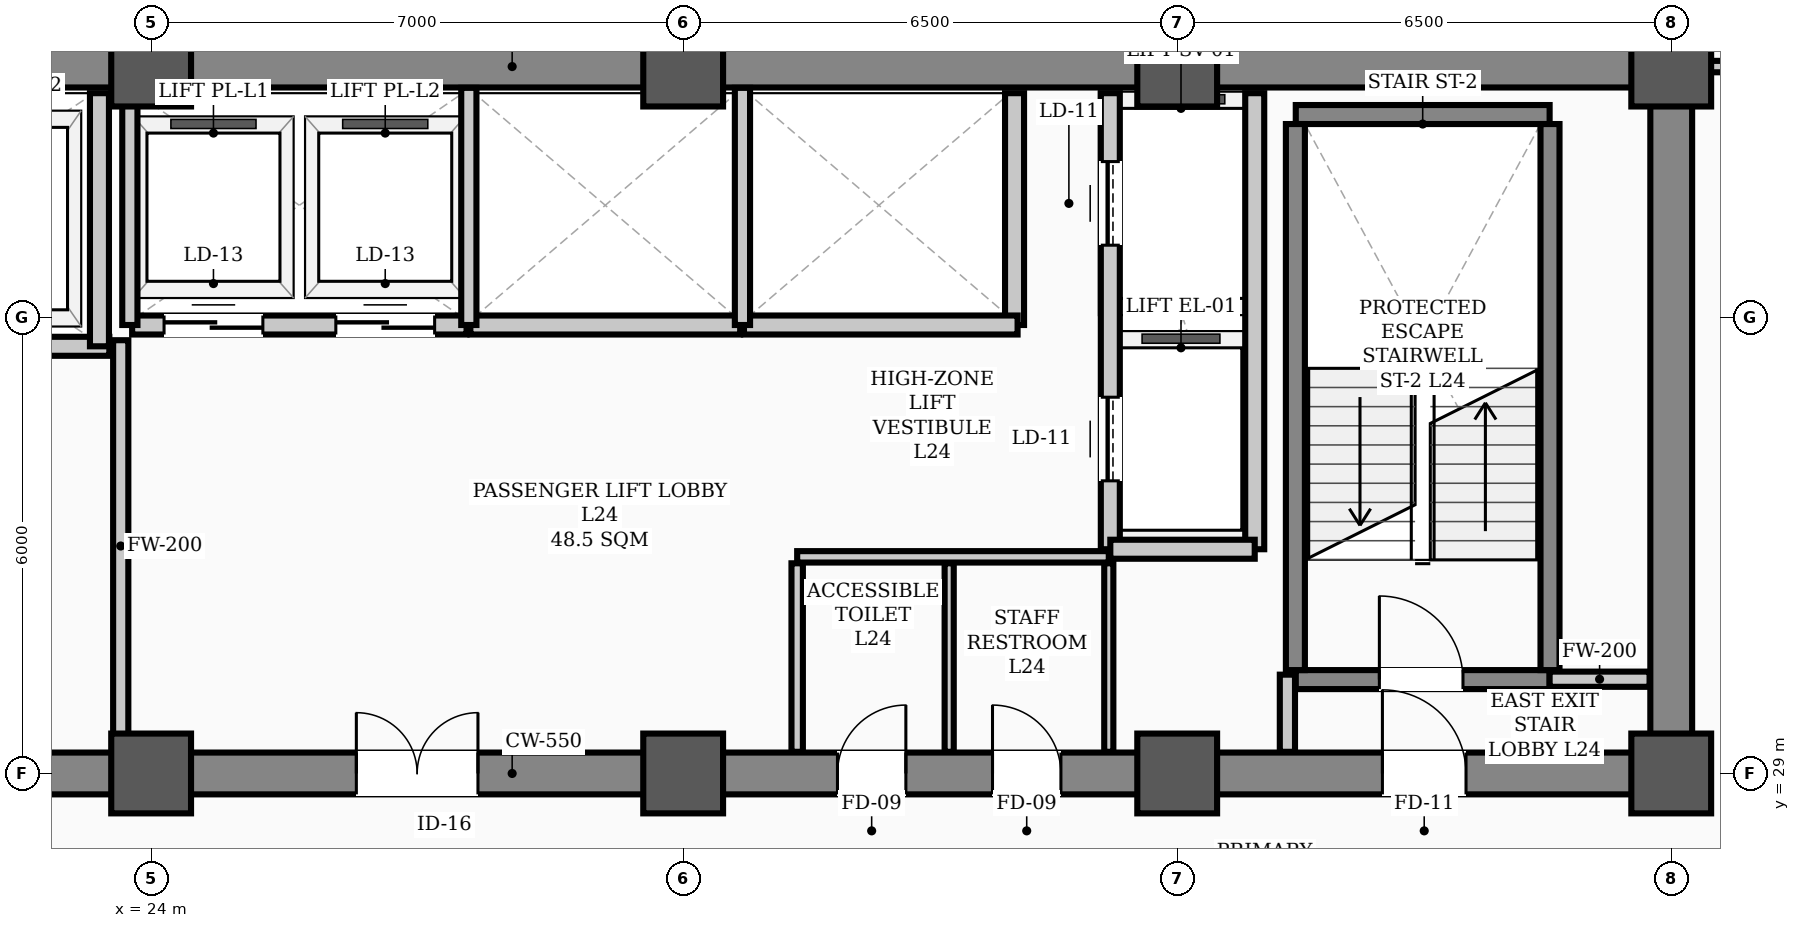
"""IFC4 building model, lengths in metres.
Left out: names, types, materials, properties, quantities, classifications, styles, units other than length and angle.
Written with IfcOpenShell. Run it as: python <this file> out.ifc"""

import sys

from ifc_helpers import new_model, si_unit, direction, frame, frame_2d, origin, origin_2d, place, context, subcontext, project, spatial, rectangle, hollow_rectangle, extrude, element, fill, save


model = new_model("IFC4")
c1 = context("Model", 3, precision=1e-05, world=origin(), true_north=direction((0.0, 1.0)))
c2 = subcontext(c1, "Body", "Model", "MODEL_VIEW")
j1 = project(units=[si_unit("LENGTHUNIT", "METRE"), si_unit("PLANEANGLEUNIT", "RADIAN")], contexts=[c1])
p1 = place(None, origin())
s1 = spatial("IfcSite", under=j1, at=p1, CompositionType="ELEMENT")
p2 = place(p1, origin())
s2 = spatial("IfcBuilding", under=s1, at=p2, CompositionType="ELEMENT")
p3 = place(p2, frame((0.0, 0.0, 96.7)))
s3 = spatial("IfcBuildingStorey", under=s2, at=p3, CompositionType="ELEMENT", Elevation=96.7)
for number, where, z_axis, x_axis in (
    (1, (24.0, 29.0, 0.0), (0.0, 0.0, 1.0), (1.0, 0.0, 0.0)),
    (2, (24.0, 38.3, 0.0), (0.0, 0.0, 1.0), (1.0, 0.0, 0.0)),
    (3, (31.0, 29.0, 0.0), (0.0, 0.0, 1.0), (1.0, 0.0, 0.0)),
    (4, (31.0, 38.3, 0.0), (0.0, 0.0, 1.0), (1.0, 0.0, 0.0)),
    (5, (37.5, 29.0, 0.0), (0.0, 0.0, 1.0), (1.0, 0.0, 0.0)),
    (6, (37.5, 38.3, 0.0), (0.0, 0.0, 1.0), (1.0, 0.0, 0.0)),
    (7, (44.0, 29.0, 0.0), (0.0, 0.0, 1.0), (1.0, 0.0, 0.0)),
    (8, (44.0, 38.3, 0.0), (0.0, 0.0, 1.0), (1.0, 0.0, 0.0)),
):
    element("IfcColumn", number, at=place(p3, frame(where, z_axis=z_axis, x_axis=x_axis)), inside=s3, PredefinedType="COLUMN", context=c2, shape_type="SweptSolid", body=[
        extrude(hollow_rectangle(XDim=1.05, YDim=1.05, WallThickness=0.038, InnerFilletRadius=0.019, OuterFilletRadius=0.057, at=origin_2d()), origin(), (0.0, 0.0, 1.0), 3.9),
    ])
p4 = place(p3, frame((13.5, 29.0, 0.0), z_axis=(0.0, 0.0, 1.0), x_axis=(1.0, 0.0, 0.0)))
e9 = element("IfcWall", 9, at=p4, inside=s3, PredefinedType="SHEAR", context=c2, shape_type="SweptSolid", body=[
    extrude(rectangle(XDim=30.5, YDim=0.55, at=frame_2d((15.25, 0.0))), origin(), (0.0, 0.0, 1.0), 3.6),
])
p5 = place(p4, frame((1.75, 0.0, 0.0)))
e10 = element("IfcOpeningElement", 10, at=p5, cuts=e9, PredefinedType="OPENING", context=c2, shape_type="SweptSolid", body=[
    extrude(rectangle(XDim=1.1, YDim=2.08, at=frame_2d((0.55, 1.04))), frame((0.0, 0.285, 0.0), z_axis=(0.0, -1.0, 0.0), x_axis=(1.0, 0.0, 0.0)), (0.0, 0.0, 1.0), 0.57),
])
p6 = place(p4, frame((26.7, 0.0, 0.0)))
e11 = element("IfcOpeningElement", 11, at=p6, cuts=e9, PredefinedType="OPENING", context=c2, shape_type="SweptSolid", body=[
    extrude(rectangle(XDim=1.1, YDim=2.08, at=frame_2d((0.55, 1.04))), frame((0.0, 0.285, 0.0), z_axis=(0.0, -1.0, 0.0), x_axis=(1.0, 0.0, 0.0)), (0.0, 0.0, 1.0), 0.57),
])
p7 = place(p4, frame((6.8, 0.0, 0.0)))
e12 = element("IfcOpeningElement", 12, at=p7, cuts=e9, PredefinedType="OPENING", context=c2, shape_type="SweptSolid", body=[
    extrude(rectangle(XDim=1.1, YDim=2.08, at=frame_2d((0.55, 1.04))), frame((0.0, 0.285, 0.0), z_axis=(0.0, -1.0, 0.0), x_axis=(1.0, 0.0, 0.0)), (0.0, 0.0, 1.0), 0.57),
])
p8 = place(p4, frame((13.2, 0.0, 0.0)))
e13 = element("IfcOpeningElement", 13, at=p8, cuts=e9, PredefinedType="OPENING", context=c2, shape_type="SweptSolid", body=[
    extrude(rectangle(XDim=1.6, YDim=2.08, at=frame_2d((0.8, 1.04))), frame((0.0, 0.285, 0.0), z_axis=(0.0, -1.0, 0.0), x_axis=(1.0, 0.0, 0.0)), (0.0, 0.0, 1.0), 0.57),
])
p9 = place(p4, frame((19.53, 0.0, 0.0)))
e14 = element("IfcOpeningElement", 14, at=p9, cuts=e9, PredefinedType="OPENING", context=c2, shape_type="SweptSolid", body=[
    extrude(rectangle(XDim=0.9, YDim=2.08, at=frame_2d((0.45, 1.04))), frame((0.0, 0.285, 0.0), z_axis=(0.0, -1.0, 0.0), x_axis=(1.0, 0.0, 0.0)), (0.0, 0.0, 1.0), 0.57),
])
p10 = place(p4, frame((21.57, 0.0, 0.0)))
e15 = element("IfcOpeningElement", 15, at=p10, cuts=e9, PredefinedType="OPENING", context=c2, shape_type="SweptSolid", body=[
    extrude(rectangle(XDim=0.9, YDim=2.08, at=frame_2d((0.45, 1.04))), frame((0.0, 0.285, 0.0), z_axis=(0.0, -1.0, 0.0), x_axis=(1.0, 0.0, 0.0)), (0.0, 0.0, 1.0), 0.57),
])
p11 = place(p3, frame((13.5, 38.3, 0.0), z_axis=(0.0, 0.0, 1.0), x_axis=(1.0, 0.0, 0.0)))
e16 = element("IfcWall", 16, at=p11, inside=s3, PredefinedType="SHEAR", context=c2, shape_type="SweptSolid", body=[
    extrude(rectangle(XDim=30.5, YDim=0.55, at=frame_2d((15.25, 0.0))), origin(), (0.0, 0.0, 1.0), 3.6),
])
p12 = place(p3, frame((44.0, 29.35, 0.0), z_axis=(0.0, 0.0, 1.0), x_axis=(0.0, 1.0, 0.0)))
e17 = element("IfcWall", 17, at=p12, inside=s3, PredefinedType="SHEAR", context=c2, shape_type="SweptSolid", body=[
    extrude(rectangle(XDim=8.6, YDim=0.55, at=frame_2d((4.3, 0.0))), origin(), (0.0, 0.0, 1.0), 3.6),
])
p13 = place(p3, frame((39.06, 30.235, 0.0), z_axis=(0.0, 0.0, 1.0), x_axis=(1.0, 0.0, 0.0)))
e18 = element("IfcWall", 18, at=p13, inside=s3, PredefinedType="STANDARD", context=c2, shape_type="SweptSolid", body=[
    extrude(rectangle(XDim=3.34, YDim=0.25, at=frame_2d((1.67, 0.0))), origin(), (0.0, 0.0, 1.0), 3.6),
])
p14 = place(p13, frame((1.1, 0.0, 0.0)))
e19 = element("IfcOpeningElement", 19, at=p14, cuts=e18, PredefinedType="OPENING", context=c2, shape_type="SweptSolid", body=[
    extrude(rectangle(XDim=1.1, YDim=2.08, at=frame_2d((0.55, 1.04))), frame((0.0, 0.135, 0.0), z_axis=(0.0, -1.0, 0.0), x_axis=(1.0, 0.0, 0.0)), (0.0, 0.0, 1.0), 0.27),
])
p15 = place(p3, frame((39.06, 37.669, 0.0), z_axis=(0.0, 0.0, 1.0), x_axis=(1.0, 0.0, 0.0)))
e20 = element("IfcWall", 20, at=p15, inside=s3, PredefinedType="STANDARD", context=c2, shape_type="SweptSolid", body=[
    extrude(rectangle(XDim=3.34, YDim=0.25, at=frame_2d((1.67, 0.0))), origin(), (0.0, 0.0, 1.0), 3.6),
])
for number, where, z_axis, x_axis in (
    (21, (39.055, 30.36, 0.0), (0.0, 0.0, 1.0), (0.0, 1.0, 0.0)),
    (22, (42.405, 30.36, 0.0), (0.0, 0.0, 1.0), (0.0, 1.0, 0.0)),
):
    element("IfcWall", number, at=place(p3, frame(where, z_axis=z_axis, x_axis=x_axis)), inside=s3, PredefinedType="STANDARD", context=c2, shape_type="SweptSolid", body=[
        extrude(rectangle(XDim=7.184, YDim=0.25, at=frame_2d((3.592, 0.0))), origin(), (0.0, 0.0, 1.0), 3.6),
    ])
p16 = place(p3, frame((18.1, 34.62, 0.0), z_axis=(0.0, 0.0, 1.0), x_axis=(1.0, 0.0, 0.0)))
e23 = element("IfcWall", 23, at=p16, inside=s3, PredefinedType="STANDARD", context=c2, shape_type="SweptSolid", body=[
    extrude(rectangle(XDim=5.35, YDim=0.25, at=frame_2d((2.675, 0.0))), origin(), (0.0, 0.0, 1.0), 3.6),
])
p17 = place(p16, frame((0.85, 0.0, 0.0)))
e24 = element("IfcOpeningElement", 24, at=p17, cuts=e23, PredefinedType="OPENING", context=c2, shape_type="SweptSolid", body=[
    extrude(rectangle(XDim=1.1, YDim=2.08, at=frame_2d((0.55, 1.04))), frame((0.0, 0.135, 0.0), z_axis=(0.0, -1.0, 0.0), x_axis=(1.0, 0.0, 0.0)), (0.0, 0.0, 1.0), 0.27),
])
p18 = place(p16, frame((3.45, 0.0, 0.0)))
e25 = element("IfcOpeningElement", 25, at=p18, cuts=e23, PredefinedType="OPENING", context=c2, shape_type="SweptSolid", body=[
    extrude(rectangle(XDim=1.1, YDim=2.08, at=frame_2d((0.55, 1.04))), frame((0.0, 0.135, 0.0), z_axis=(0.0, -1.0, 0.0), x_axis=(1.0, 0.0, 0.0)), (0.0, 0.0, 1.0), 0.27),
])
p19 = place(p3, frame((36.62, 31.95, 0.0), z_axis=(0.0, 0.0, 1.0), x_axis=(0.0, 1.0, 0.0)))
e26 = element("IfcWall", 26, at=p19, inside=s3, PredefinedType="STANDARD", context=c2, shape_type="SweptSolid", body=[
    extrude(rectangle(XDim=6.0, YDim=0.25, at=frame_2d((3.0, 0.0))), origin(), (0.0, 0.0, 1.0), 2.18),
])
p20 = place(p19, frame((0.9, 0.0, 0.0)))
e27 = element("IfcOpeningElement", 27, at=p20, cuts=e26, PredefinedType="OPENING", context=c2, shape_type="SweptSolid", body=[
    extrude(rectangle(XDim=1.1, YDim=2.08, at=frame_2d((0.55, 1.04))), frame((0.0, 0.135, 0.0), z_axis=(0.0, -1.0, 0.0), x_axis=(1.0, 0.0, 0.0)), (0.0, 0.0, 1.0), 0.27),
])
p21 = place(p19, frame((4.0, 0.0, 0.0)))
e28 = element("IfcOpeningElement", 28, at=p21, cuts=e26, PredefinedType="OPENING", context=c2, shape_type="SweptSolid", body=[
    extrude(rectangle(XDim=1.1, YDim=2.08, at=frame_2d((0.55, 1.04))), frame((0.0, 0.135, 0.0), z_axis=(0.0, -1.0, 0.0), x_axis=(1.0, 0.0, 0.0)), (0.0, 0.0, 1.0), 0.27),
])
p22 = place(p3, frame((38.52, 31.95, 0.0), z_axis=(0.0, 0.0, 1.0), x_axis=(0.0, 1.0, 0.0)))
e29 = element("IfcWall", 29, at=p22, inside=s3, PredefinedType="STANDARD", context=c2, shape_type="SweptSolid", body=[
    extrude(rectangle(XDim=6.0, YDim=0.25, at=frame_2d((3.0, 0.0))), origin(), (0.0, 0.0, 1.0), 2.18),
])
p23 = place(p3, frame((36.62, 31.95, 0.0), z_axis=(0.0, 0.0, 1.0), x_axis=(1.0, 0.0, 0.0)))
e30 = element("IfcWall", 30, at=p23, inside=s3, PredefinedType="STANDARD", context=c2, shape_type="SweptSolid", body=[
    extrude(rectangle(XDim=1.9, YDim=0.25, at=frame_2d((0.95, 0.0))), origin(), (0.0, 0.0, 1.0), 3.48),
])
p24 = place(p3, frame((23.32, 34.62, 0.0), z_axis=(0.0, 0.0, 1.0), x_axis=(0.0, 1.0, 0.0)))
e31 = element("IfcWall", 31, at=p24, inside=s3, PredefinedType="STANDARD", context=c2, shape_type="SweptSolid", body=[
    extrude(rectangle(XDim=3.33, YDim=0.25, at=frame_2d((1.665, 0.0))), origin(), (0.0, 0.0, 1.0), 2.18),
])
p25 = place(p3, frame((35.36, 34.9, 0.0), z_axis=(0.0, 0.0, 1.0), x_axis=(0.0, 1.0, 0.0)))
e32 = element("IfcWall", 32, at=p25, inside=s3, PredefinedType="STANDARD", context=c2, shape_type="SweptSolid", body=[
    extrude(rectangle(XDim=3.05, YDim=0.25, at=frame_2d((1.525, 0.0))), origin(), (0.0, 0.0, 1.0), 2.18),
])
p26 = place(p3, frame((23.75, 34.9, 0.0), z_axis=(0.0, 0.0, 1.0), x_axis=(1.0, 0.0, 0.0)))
e33 = element("IfcWall", 33, at=p26, inside=s3, PredefinedType="STANDARD", context=c2, shape_type="SweptSolid", body=[
    extrude(rectangle(XDim=4.4, YDim=0.25, at=frame_2d((2.2, 0.0))), origin(), (0.0, 0.0, 1.0), 3.6),
])
p27 = place(p26, frame((0.42, 0.0, 0.0)))
e34 = element("IfcOpeningElement", 34, at=p27, cuts=e33, PredefinedType="OPENING", context=c2, shape_type="SweptSolid", body=[
    extrude(rectangle(XDim=1.3, YDim=2.08, at=frame_2d((0.65, 1.04))), frame((0.0, 0.135, 0.0), z_axis=(0.0, -1.0, 0.0), x_axis=(1.0, 0.0, 0.0)), (0.0, 0.0, 1.0), 0.27),
])
p28 = place(p26, frame((2.68, 0.0, 0.0)))
e35 = element("IfcOpeningElement", 35, at=p28, cuts=e33, PredefinedType="OPENING", context=c2, shape_type="SweptSolid", body=[
    extrude(rectangle(XDim=1.3, YDim=2.08, at=frame_2d((0.65, 1.04))), frame((0.0, 0.135, 0.0), z_axis=(0.0, -1.0, 0.0), x_axis=(1.0, 0.0, 0.0)), (0.0, 0.0, 1.0), 0.27),
])
p29 = place(p3, frame((28.2, 34.9, 0.0), z_axis=(0.0, 0.0, 1.0), x_axis=(1.0, 0.0, 0.0)))
e36 = element("IfcWall", 36, at=p29, inside=s3, PredefinedType="STANDARD", context=c2, shape_type="SweptSolid", body=[
    extrude(rectangle(XDim=3.55, YDim=0.25, at=frame_2d((1.775, 0.0))), origin(), (0.0, 0.0, 1.0), 3.6),
])
p30 = place(p3, frame((31.8, 34.9, 0.0), z_axis=(0.0, 0.0, 1.0), x_axis=(1.0, 0.0, 0.0)))
e37 = element("IfcWall", 37, at=p30, inside=s3, PredefinedType="STANDARD", context=c2, shape_type="SweptSolid", body=[
    extrude(rectangle(XDim=3.6, YDim=0.25, at=frame_2d((1.8, 0.0))), origin(), (0.0, 0.0, 1.0), 3.6),
])
p31 = place(p3, frame((42.4, 30.24, 0.0), z_axis=(0.0, 0.0, 1.0), x_axis=(1.0, 0.0, 0.0)))
e38 = element("IfcWall", 38, at=p31, inside=s3, PredefinedType="STANDARD", context=c2, shape_type="SweptSolid", body=[
    extrude(rectangle(XDim=1.315, YDim=0.2, at=frame_2d((0.658, 0.0))), origin(), (0.0, 0.0, 1.0), 2.18),
])
p32 = place(p3, frame((32.5, 31.85, 0.0), z_axis=(0.0, 0.0, 1.0), x_axis=(1.0, 0.0, 0.0)))
e39 = element("IfcWall", 39, at=p32, inside=s3, PredefinedType="PARTITIONING", context=c2, shape_type="SweptSolid", body=[
    extrude(rectangle(XDim=4.1, YDim=0.15, at=frame_2d((2.05, 0.0))), origin(), (0.0, 0.0, 1.0), 3.6),
])
p33 = place(p3, frame((44.0, 38.3, 0.0), z_axis=(0.0, 0.0, 1.0), x_axis=(1.0, 0.0, 0.0)))
e40 = element("IfcWall", 40, at=p33, inside=s3, PredefinedType="PARTITIONING", context=c2, shape_type="SweptSolid", body=[
    extrude(rectangle(XDim=13.19, YDim=0.15, at=frame_2d((6.595, 0.0))), origin(), (0.0, 0.0, 1.0), 2.18),
])
p34 = place(p3, frame((38.95, 29.285, 0.0), z_axis=(0.0, 0.0, 1.0), x_axis=(0.0, 1.0, 0.0)))
e41 = element("IfcWall", 41, at=p34, inside=s3, PredefinedType="STANDARD", context=c2, shape_type="SweptSolid", body=[
    extrude(rectangle(XDim=1.015, YDim=0.2, at=frame_2d((0.508, 0.0))), origin(), (0.0, 0.0, 1.0), 2.18),
])
p35 = place(p3, frame((23.6, 29.285, 0.0), z_axis=(0.0, 0.0, 1.0), x_axis=(0.0, 1.0, 0.0)))
e42 = element("IfcWall", 42, at=p35, inside=s3, PredefinedType="STANDARD", context=c2, shape_type="SweptSolid", body=[
    extrude(rectangle(XDim=5.415, YDim=0.2, at=frame_2d((2.708, 0.0))), origin(), (0.0, 0.0, 1.0), 2.18),
])
p36 = place(p3, frame((32.5, 29.285, 0.0), z_axis=(0.0, 0.0, 1.0), x_axis=(0.0, 1.0, 0.0)))
e43 = element("IfcWall", 43, at=p36, inside=s3, PredefinedType="PARTITIONING", context=c2, shape_type="SweptSolid", body=[
    extrude(rectangle(XDim=2.48, YDim=0.15, at=frame_2d((1.24, 0.0))), origin(), (0.0, 0.0, 1.0), 2.18),
])
for number, where, z_axis, x_axis in (
    (44, (36.6, 29.285, 0.0), (0.0, 0.0, 1.0), (0.0, 1.0, 0.0)),
    (45, (34.5, 29.285, 0.0), (0.0, 0.0, 1.0), (0.0, 1.0, 0.0)),
):
    element("IfcWall", number, at=place(p3, frame(where, z_axis=z_axis, x_axis=x_axis)), inside=s3, PredefinedType="PARTITIONING", context=c2, shape_type="SweptSolid", body=[
        extrude(rectangle(XDim=2.48, YDim=0.12, at=frame_2d((1.24, 0.0))), origin(), (0.0, 0.0, 1.0), 2.18),
    ])
for number, where, z_axis, x_axis in (
    (46, (23.72, 34.9, 0.0), (0.0, 0.0, 1.0), (0.0, 1.0, 0.0)),
    (47, (28.18, 34.9, 0.0), (0.0, 0.0, 1.0), (0.0, 1.0, 0.0)),
    (48, (31.78, 34.9, 0.0), (0.0, 0.0, 1.0), (0.0, 1.0, 0.0)),
):
    element("IfcWall", number, at=place(p3, frame(where, z_axis=z_axis, x_axis=x_axis)), inside=s3, PredefinedType="STANDARD", context=c2, shape_type="SweptSolid", body=[
        extrude(rectangle(XDim=3.12, YDim=0.2, at=frame_2d((1.56, 0.0))), origin(), (0.0, 0.0, 1.0), 2.18),
    ])
p37 = place(p14, origin())
e49 = element("IfcDoor", 49, at=p37, inside=s3, OperationType="SINGLE_SWING_LEFT", PredefinedType="DOOR", context=c2, shape_type="SweptSolid", body=[
    extrude(rectangle(XDim=1.1, YDim=2.08, at=frame_2d((0.55, 1.04))), frame((0.0, 0.025, 0.0), z_axis=(0.0, -1.0, 0.0), x_axis=(1.0, 0.0, 0.0)), (0.0, 0.0, 1.0), 0.05),
])
fill(e19, e49)
p38 = place(p6, origin())
e50 = element("IfcDoor", 50, at=p38, inside=s3, OperationType="SINGLE_SWING_LEFT", PredefinedType="DOOR", context=c2, shape_type="SweptSolid", body=[
    extrude(rectangle(XDim=1.1, YDim=2.08, at=frame_2d((0.55, 1.04))), frame((0.0, 0.025, 0.0), z_axis=(0.0, -1.0, 0.0), x_axis=(1.0, 0.0, 0.0)), (0.0, 0.0, 1.0), 0.05),
])
fill(e11, e50)
p39 = place(p8, origin())
e51 = element("IfcDoor", 51, at=p39, inside=s3, OperationType="DOUBLE_DOOR_SINGLE_SWING", PredefinedType="DOOR", context=c2, shape_type="SweptSolid", body=[
    extrude(rectangle(XDim=1.6, YDim=2.08, at=frame_2d((0.8, 1.04))), frame((0.0, 0.025, 0.0), z_axis=(0.0, -1.0, 0.0), x_axis=(1.0, 0.0, 0.0)), (0.0, 0.0, 1.0), 0.05),
])
fill(e13, e51)
p40 = place(p9, origin())
e52 = element("IfcDoor", 52, at=p40, inside=s3, OperationType="SINGLE_SWING_RIGHT", PredefinedType="DOOR", context=c2, shape_type="SweptSolid", body=[
    extrude(rectangle(XDim=0.9, YDim=2.08, at=frame_2d((0.45, 1.04))), frame((0.0, 0.025, 0.0), z_axis=(0.0, -1.0, 0.0), x_axis=(1.0, 0.0, 0.0)), (0.0, 0.0, 1.0), 0.05),
])
fill(e14, e52)
p41 = place(p10, origin())
e53 = element("IfcDoor", 53, at=p41, inside=s3, OperationType="SINGLE_SWING_LEFT", PredefinedType="DOOR", context=c2, shape_type="SweptSolid", body=[
    extrude(rectangle(XDim=0.9, YDim=2.08, at=frame_2d((0.45, 1.04))), frame((0.0, 0.025, 0.0), z_axis=(0.0, -1.0, 0.0), x_axis=(1.0, 0.0, 0.0)), (0.0, 0.0, 1.0), 0.05),
])
fill(e15, e53)
p42 = place(p20, origin())
e54 = element("IfcDoor", 54, at=p42, inside=s3, OperationType="SLIDING_TO_LEFT", PredefinedType="DOOR", context=c2, shape_type="SweptSolid", body=[
    extrude(rectangle(XDim=1.1, YDim=2.08, at=frame_2d((0.55, 1.04))), frame((0.0, 0.025, 0.0), z_axis=(0.0, -1.0, 0.0), x_axis=(1.0, 0.0, 0.0)), (0.0, 0.0, 1.0), 0.05),
])
fill(e27, e54)
p43 = place(p21, origin())
e55 = element("IfcDoor", 55, at=p43, inside=s3, OperationType="SLIDING_TO_LEFT", PredefinedType="DOOR", context=c2, shape_type="SweptSolid", body=[
    extrude(rectangle(XDim=1.1, YDim=2.08, at=frame_2d((0.55, 1.04))), frame((0.0, 0.025, 0.0), z_axis=(0.0, -1.0, 0.0), x_axis=(1.0, 0.0, 0.0)), (0.0, 0.0, 1.0), 0.05),
])
fill(e28, e55)
p44 = place(p27, origin())
e56 = element("IfcDoor", 56, at=p44, inside=s3, OperationType="DOUBLE_DOOR_SLIDING", PredefinedType="DOOR", context=c2, shape_type="SweptSolid", body=[
    extrude(rectangle(XDim=1.3, YDim=2.08, at=frame_2d((0.65, 1.04))), frame((0.0, 0.025, 0.0), z_axis=(0.0, -1.0, 0.0), x_axis=(1.0, 0.0, 0.0)), (0.0, 0.0, 1.0), 0.05),
])
fill(e34, e56)
p45 = place(p28, origin())
e57 = element("IfcDoor", 57, at=p45, inside=s3, OperationType="DOUBLE_DOOR_SLIDING", PredefinedType="DOOR", context=c2, shape_type="SweptSolid", body=[
    extrude(rectangle(XDim=1.3, YDim=2.08, at=frame_2d((0.65, 1.04))), frame((0.0, 0.025, 0.0), z_axis=(0.0, -1.0, 0.0), x_axis=(1.0, 0.0, 0.0)), (0.0, 0.0, 1.0), 0.05),
])
fill(e35, e57)
save(model, sys.argv[1])
